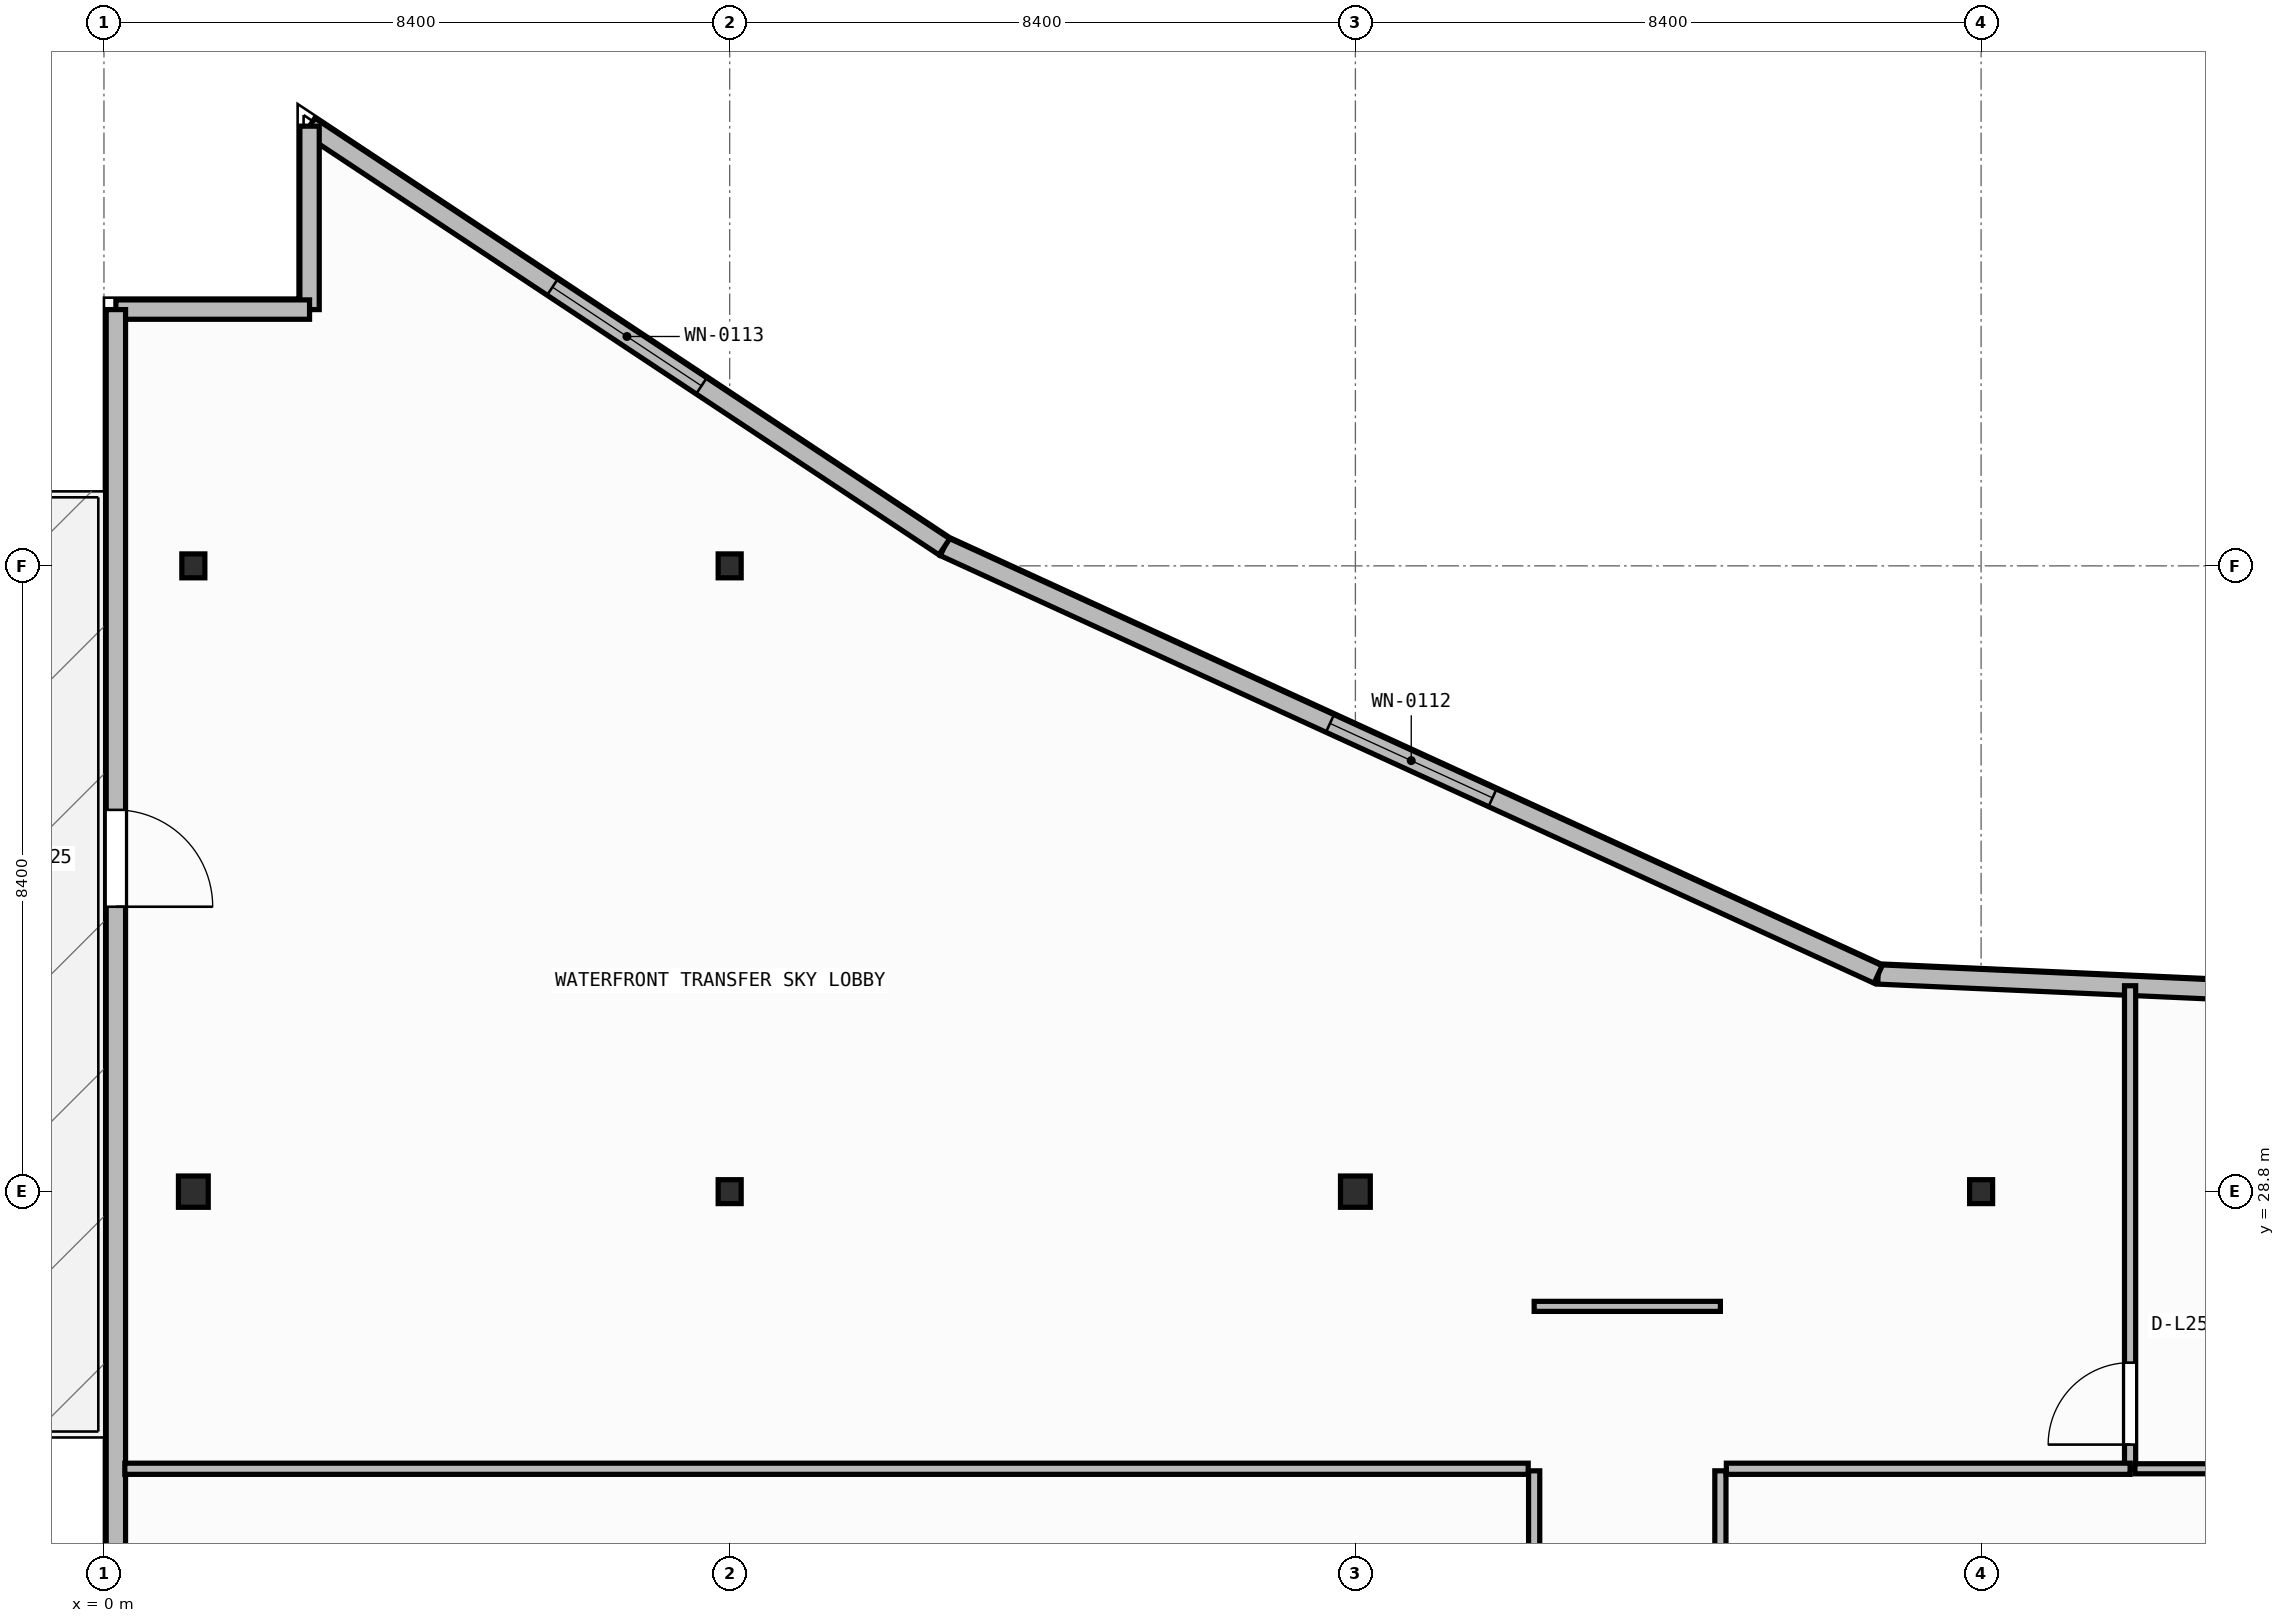
"""IFC4 building model, lengths in metres.
Left out: names, types, materials, properties, quantities, classifications, styles, units other than length and angle.
Written with IfcOpenShell. Run it as: python <this file> out.ifc"""

import sys

from ifc_helpers import new_model, si_unit, direction, frame, frame_2d, origin, origin_2d, place, context, subcontext, project, spatial, rectangle, i_section, extrude, element, fill, save


model = new_model("IFC4")
c1 = context("Model", 3, precision=1e-05, world=origin(), true_north=direction((0.0, 1.0)))
c2 = subcontext(c1, "Body", "Model", "MODEL_VIEW")
j1 = project(units=[si_unit("LENGTHUNIT", "METRE"), si_unit("PLANEANGLEUNIT", "RADIAN")], contexts=[c1])
p1 = place(None, origin())
s1 = spatial("IfcSite", under=j1, at=p1, CompositionType="ELEMENT")
p2 = place(p1, origin())
s2 = spatial("IfcBuilding", under=s1, at=p2, CompositionType="ELEMENT")
p3 = place(p2, frame((0.0, 0.0, 103.35)))
s3 = spatial("IfcBuildingStorey", under=s2, at=p3, CompositionType="ELEMENT", Elevation=103.35)
p4 = place(p3, frame((1.2, 28.8, 0.0), z_axis=(0.0, 0.0, 1.0), x_axis=(1.0, 0.0, 0.0)))
e1 = element("IfcColumn", 1, at=p4, inside=s3, PredefinedType="COLUMN", context=c2, shape_type="SweptSolid", body=[
    extrude(i_section(OverallWidth=0.4, OverallDepth=0.42, WebThickness=0.025, FlangeThickness=0.04, at=origin_2d()), origin(), (0.0, 0.0, 1.0), 3.95),
])
p5 = place(p3, frame((8.4, 28.8, 0.0), z_axis=(0.0, 0.0, 1.0), x_axis=(1.0, 0.0, 0.0)))
e2 = element("IfcColumn", 2, at=p5, inside=s3, PredefinedType="COLUMN", context=c2, shape_type="SweptSolid", body=[
    extrude(i_section(OverallWidth=0.309, OverallDepth=0.321, WebThickness=0.014, FlangeThickness=0.022, FilletRadius=0.017, at=origin_2d()), origin(), (0.0, 0.0, 1.0), 3.95),
])
p6 = place(p3, frame((16.8, 28.8, 0.0), z_axis=(0.0, 0.0, 1.0), x_axis=(1.0, 0.0, 0.0)))
e3 = element("IfcColumn", 3, at=p6, inside=s3, PredefinedType="COLUMN", context=c2, shape_type="SweptSolid", body=[
    extrude(i_section(OverallWidth=0.4, OverallDepth=0.42, WebThickness=0.025, FlangeThickness=0.04, at=origin_2d()), origin(), (0.0, 0.0, 1.0), 3.95),
])
for number, where, z_axis, x_axis in (
    (4, (25.2, 28.8, 0.0), (0.0, 0.0, 1.0), (1.0, 0.0, 0.0)),
    (5, (1.2, 37.2, 0.0), (0.0, 0.0, 1.0), (1.0, 0.0, 0.0)),
    (6, (8.4, 37.2, 0.0), (0.0, 0.0, 1.0), (1.0, 0.0, 0.0)),
):
    element("IfcColumn", number, at=place(p3, frame(where, z_axis=z_axis, x_axis=x_axis)), inside=s3, PredefinedType="COLUMN", context=c2, shape_type="SweptSolid", body=[
        extrude(i_section(OverallWidth=0.309, OverallDepth=0.321, WebThickness=0.014, FlangeThickness=0.022, FilletRadius=0.017, at=origin_2d()), origin(), (0.0, 0.0, 1.0), 3.95),
    ])
p7 = place(p3, frame((38.63, 31.052, 0.0), z_axis=(0.0, 0.0, 1.0), x_axis=(-0.998996592956, 0.044786239663, 0.0)))
e7 = element("IfcWall", 7, at=p7, inside=s3, PredefinedType="STANDARD", context=c2, shape_type="SweptSolid", body=[
    extrude(rectangle(XDim=14.827, YDim=0.26, at=frame_2d((7.414, 0.0))), origin(), (0.0, 0.0, 1.0), 3.71),
])
p8 = place(p7, frame((6.214, 0.0, 0.9)))
e8 = element("IfcOpeningElement", 8, at=p8, cuts=e7, PredefinedType="OPENING", context=c2, shape_type="SweptSolid", body=[
    extrude(rectangle(XDim=2.4, YDim=1.65, at=frame_2d((1.2, 0.825))), frame((0.0, 0.14, 0.0), z_axis=(0.0, -1.0, 0.0), x_axis=(1.0, 0.0, 0.0)), (0.0, 0.0, 1.0), 0.28),
])
p9 = place(p3, frame((23.818, 31.716, 0.0), z_axis=(0.0, 0.0, 1.0), x_axis=(-0.909209527513, 0.416338846471, 0.0)))
e9 = element("IfcWall", 9, at=p9, inside=s3, PredefinedType="STANDARD", context=c2, shape_type="SweptSolid", body=[
    extrude(rectangle(XDim=13.787, YDim=0.26, at=frame_2d((6.894, 0.0))), origin(), (0.0, 0.0, 1.0), 3.71),
])
p10 = place(p9, frame((5.694, 0.0, 0.9)))
e10 = element("IfcOpeningElement", 10, at=p10, cuts=e9, PredefinedType="OPENING", context=c2, shape_type="SweptSolid", body=[
    extrude(rectangle(XDim=2.4, YDim=1.65, at=frame_2d((1.2, 0.825))), frame((0.0, 0.14, 0.0), z_axis=(0.0, -1.0, 0.0), x_axis=(1.0, 0.0, 0.0)), (0.0, 0.0, 1.0), 0.28),
])
p11 = place(p3, frame((11.282, 37.456, 0.0), z_axis=(0.0, 0.0, 1.0), x_axis=(-0.833630474253, 0.552322580017, 0.0)))
e11 = element("IfcWall", 11, at=p11, inside=s3, PredefinedType="STANDARD", context=c2, shape_type="SweptSolid", body=[
    extrude(rectangle(XDim=10.223, YDim=0.26, at=frame_2d((5.111, 0.0))), origin(), (0.0, 0.0, 1.0), 3.71),
])
p12 = place(p11, frame((3.911, 0.0, 0.9)))
e12 = element("IfcOpeningElement", 12, at=p12, cuts=e11, PredefinedType="OPENING", context=c2, shape_type="SweptSolid", body=[
    extrude(rectangle(XDim=2.4, YDim=1.65, at=frame_2d((1.2, 0.825))), frame((0.0, 0.14, 0.0), z_axis=(0.0, -1.0, 0.0), x_axis=(1.0, 0.0, 0.0)), (0.0, 0.0, 1.0), 0.28),
])
p13 = place(p3, frame((2.76, 43.102, 0.0), z_axis=(0.0, 0.0, 1.0), x_axis=(0.0, -1.0, 0.0)))
e13 = element("IfcWall", 13, at=p13, inside=s3, PredefinedType="STANDARD", context=c2, shape_type="SweptSolid", body=[
    extrude(rectangle(XDim=2.462, YDim=0.26, at=frame_2d((1.231, 0.0))), origin(), (0.0, 0.0, 1.0), 3.71),
])
p14 = place(p3, frame((2.76, 40.64, 0.0), z_axis=(0.0, 0.0, 1.0), x_axis=(-1.0, 0.0, 0.0)))
e14 = element("IfcWall", 14, at=p14, inside=s3, PredefinedType="STANDARD", context=c2, shape_type="SweptSolid", body=[
    extrude(rectangle(XDim=2.6, YDim=0.26, at=frame_2d((1.3, 0.0))), origin(), (0.0, 0.0, 1.0), 3.71),
])
p15 = place(p3, frame((0.16, 40.64, 0.0), z_axis=(0.0, 0.0, 1.0), x_axis=(0.0, -1.0, 0.0)))
e15 = element("IfcWall", 15, at=p15, inside=s3, PredefinedType="STANDARD", context=c2, shape_type="SweptSolid", body=[
    extrude(rectangle(XDim=37.88, YDim=0.26, at=frame_2d((18.94, 0.0))), origin(), (0.0, 0.0, 1.0), 3.71),
])
p16 = place(p15, frame((6.716, 0.0, 0.0)))
e16 = element("IfcOpeningElement", 16, at=p16, cuts=e15, PredefinedType="OPENING", context=c2, shape_type="SweptSolid", body=[
    extrude(rectangle(XDim=1.3, YDim=2.15, at=frame_2d((0.65, 1.075))), frame((0.0, 0.14, 0.0), z_axis=(0.0, -1.0, 0.0), x_axis=(1.0, 0.0, 0.0)), (0.0, 0.0, 1.0), 0.28),
])
p17 = place(p3, frame((21.7, 27.26, 0.0), z_axis=(0.0, 0.0, 1.0), x_axis=(-1.0, 0.0, 0.0)))
e17 = element("IfcWall", 17, at=p17, inside=s3, PredefinedType="PARTITIONING", context=c2, shape_type="SweptSolid", body=[
    extrude(rectangle(XDim=2.5, YDim=0.135, at=frame_2d((1.25, 0.0))), origin(), (0.0, 0.0, 1.0), 3.71),
])
p18 = place(p3, frame((19.2, 25.052, 0.0), z_axis=(0.0, 0.0, 1.0), x_axis=(0.0, -1.0, 0.0)))
e18 = element("IfcWall", 18, at=p18, inside=s3, PredefinedType="PARTITIONING", context=c2, shape_type="SweptSolid", body=[
    extrude(rectangle(XDim=10.353, YDim=0.15, at=frame_2d((5.176, 0.0))), origin(), (0.0, 0.0, 1.0), 3.71),
])
p19 = place(p3, frame((21.7, 20.597, 0.0), z_axis=(0.0, 0.0, 1.0), x_axis=(0.0, 1.0, 0.0)))
e19 = element("IfcWall", 19, at=p19, inside=s3, PredefinedType="PARTITIONING", context=c2, shape_type="SweptSolid", body=[
    extrude(rectangle(XDim=4.455, YDim=0.15, at=frame_2d((2.228, 0.0))), origin(), (0.0, 0.0, 1.0), 3.71),
])
p20 = place(p19, frame((1.677, 0.0, 0.0)))
e20 = element("IfcOpeningElement", 20, at=p20, cuts=e19, PredefinedType="OPENING", context=c2, shape_type="SweptSolid", body=[
    extrude(rectangle(XDim=1.1, YDim=2.1, at=frame_2d((0.55, 1.05))), frame((0.0, 0.085, 0.0), z_axis=(0.0, -1.0, 0.0), x_axis=(1.0, 0.0, 0.0)), (0.0, 0.0, 1.0), 0.17),
])
p21 = place(p3, frame((27.2, 25.08, 0.0), z_axis=(0.0, 0.0, 1.0), x_axis=(0.0, 1.0, 0.0)))
e21 = element("IfcWall", 21, at=p21, inside=s3, PredefinedType="PARTITIONING", context=c2, shape_type="SweptSolid", body=[
    extrude(rectangle(XDim=6.484, YDim=0.15, at=frame_2d((3.242, 0.0))), origin(), (0.0, 0.0, 1.0), 3.71),
])
p22 = place(p21, frame((0.325, 0.0, 0.0)))
e22 = element("IfcOpeningElement", 22, at=p22, cuts=e21, PredefinedType="OPENING", context=c2, shape_type="SweptSolid", body=[
    extrude(rectangle(XDim=1.1, YDim=2.1, at=frame_2d((0.55, 1.05))), frame((0.0, 0.085, 0.0), z_axis=(0.0, -1.0, 0.0), x_axis=(1.0, 0.0, 0.0)), (0.0, 0.0, 1.0), 0.17),
])
p23 = place(p3, frame((0.28, 25.08, 0.0), z_axis=(0.0, 0.0, 1.0), x_axis=(1.0, 0.0, 0.0)))
e23 = element("IfcWall", 23, at=p23, inside=s3, PredefinedType="PARTITIONING", context=c2, shape_type="SweptSolid", body=[
    extrude(rectangle(XDim=18.84, YDim=0.15, at=frame_2d((9.42, 0.0))), origin(), (0.0, 0.0, 1.0), 3.381),
])
p24 = place(p3, frame((21.78, 25.08, 0.0), z_axis=(0.0, 0.0, 1.0), x_axis=(1.0, 0.0, 0.0)))
e24 = element("IfcWall", 24, at=p24, inside=s3, PredefinedType="PARTITIONING", context=c2, shape_type="SweptSolid", body=[
    extrude(rectangle(XDim=5.42, YDim=0.15, at=frame_2d((2.71, 0.0))), origin(), (0.0, 0.0, 1.0), 3.381),
])
p25 = place(p3, frame((27.265, 25.08, 0.0), z_axis=(0.0, 0.0, 1.0), x_axis=(1.0, 0.0, 0.0)))
e25 = element("IfcWall", 25, at=p25, inside=s3, PredefinedType="PARTITIONING", context=c2, shape_type="SweptSolid", body=[
    extrude(rectangle(XDim=29.375, YDim=0.135, at=frame_2d((14.688, 0.0))), origin(), (0.0, 0.0, 1.0), 3.381),
])
p26 = place(p10, origin())
e26 = element("IfcWindow", 26, at=p26, inside=s3, PartitioningType="SINGLE_PANEL", PredefinedType="WINDOW", context=c2, shape_type="SweptSolid", body=[
    extrude(rectangle(XDim=2.4, YDim=1.65, at=frame_2d((1.2, 0.825))), frame((0.0, 0.03, 0.0), z_axis=(0.0, -1.0, 0.0), x_axis=(1.0, 0.0, 0.0)), (0.0, 0.0, 1.0), 0.06),
])
fill(e10, e26)
p27 = place(p12, origin())
e27 = element("IfcWindow", 27, at=p27, inside=s3, PartitioningType="SINGLE_PANEL", PredefinedType="WINDOW", context=c2, shape_type="SweptSolid", body=[
    extrude(rectangle(XDim=2.4, YDim=1.65, at=frame_2d((1.2, 0.825))), frame((0.0, 0.03, 0.0), z_axis=(0.0, -1.0, 0.0), x_axis=(1.0, 0.0, 0.0)), (0.0, 0.0, 1.0), 0.06),
])
fill(e12, e27)
p28 = place(p16, origin())
e28 = element("IfcDoor", 28, at=p28, inside=s3, OperationType="SINGLE_SWING_RIGHT", PredefinedType="DOOR", context=c2, shape_type="SweptSolid", body=[
    extrude(rectangle(XDim=1.3, YDim=2.15, at=frame_2d((0.65, 1.075))), frame((0.0, 0.025, 0.0), z_axis=(0.0, -1.0, 0.0), x_axis=(1.0, 0.0, 0.0)), (0.0, 0.0, 1.0), 0.05),
])
fill(e16, e28)
p29 = place(p22, origin())
e29 = element("IfcDoor", 29, at=p29, inside=s3, OperationType="SINGLE_SWING_LEFT", PredefinedType="DOOR", context=c2, shape_type="SweptSolid", body=[
    extrude(rectangle(XDim=1.1, YDim=2.1, at=frame_2d((0.55, 1.05))), frame((0.0, 0.025, 0.0), z_axis=(0.0, -1.0, 0.0), x_axis=(1.0, 0.0, 0.0)), (0.0, 0.0, 1.0), 0.05),
])
fill(e22, e29)
save(model, sys.argv[1])
